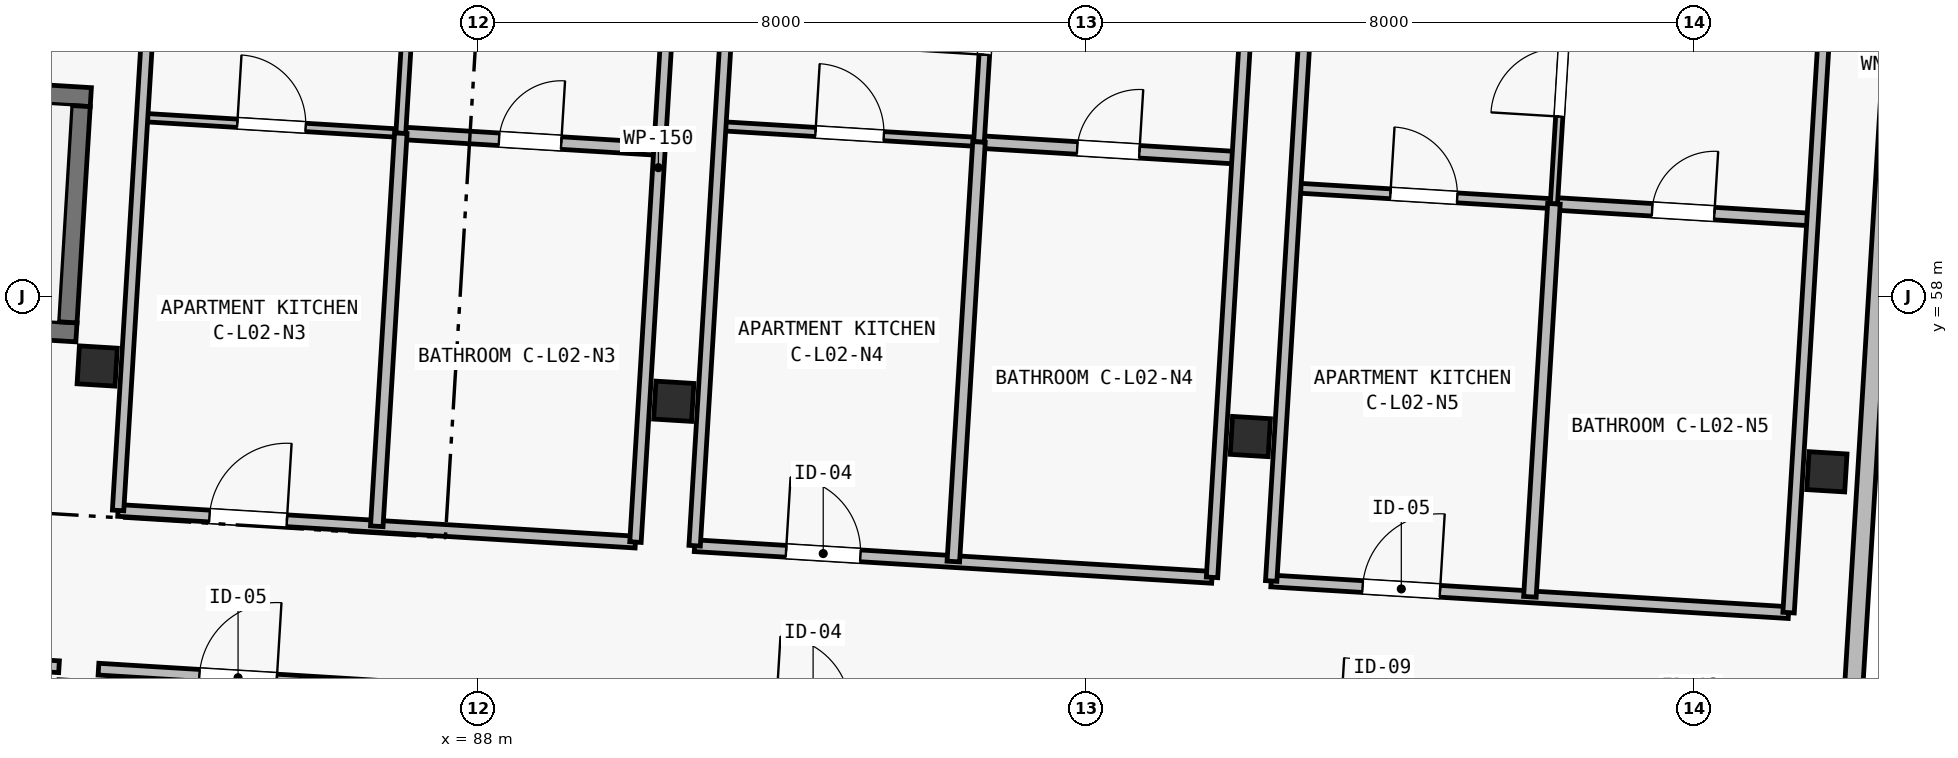
"""IFC4 building model, lengths in metres.
Left out: names, types, materials, properties, quantities, classifications, styles, units other than length and angle.
Written with IfcOpenShell. Run it as: python <this file> out.ifc"""

import sys

from ifc_helpers import new_model, si_unit, direction, frame, frame_2d, origin, origin_2d, place, context, subcontext, project, spatial, rectangle, extrude, element, fill, save


model = new_model("IFC4")
c1 = context("Model", 3, precision=1e-05, world=origin(), true_north=direction((0.0, 1.0)))
c2 = subcontext(c1, "Body", "Model", "MODEL_VIEW")
j1 = project(units=[si_unit("LENGTHUNIT", "METRE"), si_unit("PLANEANGLEUNIT", "RADIAN")], contexts=[c1])
p1 = place(None, origin())
s1 = spatial("IfcSite", under=j1, at=p1, CompositionType="ELEMENT")
p2 = place(p1, origin())
s2 = spatial("IfcBuilding", under=s1, at=p2, CompositionType="ELEMENT")
p3 = place(p2, frame((0.0, 0.0, 8.4)))
s3 = spatial("IfcBuildingStorey", under=s2, at=p3, CompositionType="ELEMENT", Elevation=8.4)
for number, where, z_axis, x_axis in (
    (1, (82.99, 57.086, 0.0), (0.0, 0.0, 1.0), (0.998, -0.061, 0.0)),
    (2, (90.576, 56.622, 0.0), (0.0, 0.0, 1.0), (0.998, -0.061, 0.0)),
    (3, (98.162, 56.158, 0.0), (0.0, 0.0, 1.0), (0.998, -0.061, 0.0)),
    (4, (105.748, 55.694, 0.0), (0.0, 0.0, 1.0), (0.998, -0.061, 0.0)),
):
    element("IfcColumn", number, at=place(p3, frame(where, z_axis=z_axis, x_axis=x_axis)), inside=s3, PredefinedType="COLUMN", context=c2, shape_type="SweptSolid", body=[
        extrude(rectangle(XDim=0.5, YDim=0.5, at=origin_2d()), origin(), (0.0, 0.0, 1.0), 3.25),
    ])
p4 = place(p3, frame((75.919, 61.05, 0.0), z_axis=(0.0, 0.0, 1.0), x_axis=(0.998135546153, -0.061036313012, 0.0)))
e5 = element("IfcWall", 5, at=p4, inside=s3, PredefinedType="SHEAR", context=c2, shape_type="SweptSolid", body=[
    extrude(rectangle(XDim=7.0, YDim=0.25, at=frame_2d((3.5, 0.0))), origin(), (0.0, 0.0, 1.0), 3.25),
])
p5 = place(p4, frame((0.45, 0.0, 0.0)))
e6 = element("IfcOpeningElement", 6, at=p5, cuts=e5, PredefinedType="OPENING", context=c2, shape_type="SweptSolid", body=[
    extrude(rectangle(XDim=0.9, YDim=2.1, at=frame_2d((0.45, 1.05))), frame((0.0, 0.14, 0.0), z_axis=(0.0, -1.0, 0.0), x_axis=(1.0, 0.0, 0.0)), (0.0, 0.0, 1.0), 0.28),
])
p6 = place(p3, frame((75.73, 57.956, 0.0), z_axis=(0.0, 0.0, 1.0), x_axis=(0.998135546153, -0.061036313012, 0.0)))
e7 = element("IfcWall", 7, at=p6, inside=s3, PredefinedType="SHEAR", context=c2, shape_type="SweptSolid", body=[
    extrude(rectangle(XDim=7.0, YDim=0.25, at=frame_2d((3.5, 0.0))), origin(), (0.0, 0.0, 1.0), 3.25),
])
p7 = place(p6, frame((0.45, 0.0, 0.0)))
e8 = element("IfcOpeningElement", 8, at=p7, cuts=e7, PredefinedType="OPENING", context=c2, shape_type="SweptSolid", body=[
    extrude(rectangle(XDim=1.05, YDim=2.15, at=frame_2d((0.525, 1.075))), frame((0.0, 0.14, 0.0), z_axis=(0.0, -1.0, 0.0), x_axis=(1.0, 0.0, 0.0)), (0.0, 0.0, 1.0), 0.28),
])
p8 = place(p3, frame((82.599, 57.661, 0.0), z_axis=(0.0, 0.0, 1.0), x_axis=(0.06107697143, 0.998133059046, 0.0)))
e9 = element("IfcWall", 9, at=p8, inside=s3, PredefinedType="SHEAR", context=c2, shape_type="SweptSolid", body=[
    extrude(rectangle(XDim=2.85, YDim=0.25, at=frame_2d((1.425, 0.0))), origin(), (0.0, 0.0, 1.0), 3.25),
])
p9 = place(p3, frame((106.768, 63.771, 0.0), z_axis=(0.0, 0.0, 1.0), x_axis=(-0.061053332998, -0.99813450523, 0.0)))
e10 = element("IfcWall", 10, at=p9, inside=s3, PredefinedType="SOLIDWALL", context=c2, shape_type="SweptSolid", body=[
    extrude(rectangle(XDim=20.65, YDim=0.24, at=frame_2d((10.325, 0.0))), origin(), (0.0, 0.0, 1.0), 3.0),
])
p10 = place(p9, frame((2.81, 0.0, 0.45)))
e11 = element("IfcOpeningElement", 11, at=p10, cuts=e10, PredefinedType="OPENING", context=c2, shape_type="SweptSolid", body=[
    extrude(rectangle(XDim=0.6, YDim=2.22, at=frame_2d((0.3, 1.11))), frame((0.0, 0.135, 0.0), z_axis=(0.0, -1.0, 0.0), x_axis=(1.0, 0.0, 0.0)), (0.0, 0.0, 1.0), 0.27),
])
p11 = place(p9, frame((17.1, 0.0, 0.52)))
e12 = element("IfcOpeningElement", 12, at=p11, cuts=e10, PredefinedType="OPENING", context=c2, shape_type="SweptSolid", body=[
    extrude(rectangle(XDim=0.74, YDim=2.26, at=frame_2d((0.37, 1.13))), frame((0.0, 0.135, 0.0), z_axis=(0.0, -1.0, 0.0), x_axis=(1.0, 0.0, 0.0)), (0.0, 0.0, 1.0), 0.27),
])
p12 = place(p3, frame((78.415, 53.378, 0.0), z_axis=(0.0, 0.0, 1.0), x_axis=(0.998131852862, -0.061096679962, 0.0)))
e13 = element("IfcWall", 13, at=p12, inside=s3, PredefinedType="PARTITIONING", context=c2, shape_type="SweptSolid", body=[
    extrude(rectangle(XDim=4.08, YDim=0.155, at=frame_2d((2.04, 0.0))), origin(), (0.0, 0.0, 1.0), 2.97),
])
p13 = place(p12, frame((0.457, 0.0, 0.0)))
e14 = element("IfcOpeningElement", 14, at=p13, cuts=e13, PredefinedType="OPENING", context=c2, shape_type="SweptSolid", body=[
    extrude(rectangle(XDim=0.98, YDim=2.15, at=frame_2d((0.49, 1.075))), frame((0.0, 0.093, 0.0), z_axis=(0.0, -1.0, 0.0), x_axis=(1.0, 0.0, 0.0)), (0.0, 0.0, 1.0), 0.185),
])
p14 = place(p3, frame((83.007, 53.097, 0.0), z_axis=(0.0, 0.0, 1.0), x_axis=(0.998135666539, -0.061034344288, 0.0)))
e15 = element("IfcWall", 15, at=p14, inside=s3, PredefinedType="PARTITIONING", context=c2, shape_type="SweptSolid", body=[
    extrude(rectangle(XDim=7.08, YDim=0.155, at=frame_2d((3.54, 0.0))), origin(), (0.0, 0.0, 1.0), 2.97),
])
p15 = place(p14, frame((1.33, 0.0, 0.0)))
e16 = element("IfcOpeningElement", 16, at=p15, cuts=e15, PredefinedType="OPENING", context=c2, shape_type="SweptSolid", body=[
    extrude(rectangle(XDim=1.02, YDim=2.2, at=frame_2d((0.51, 1.1))), frame((0.0, 0.093, 0.0), z_axis=(0.0, -1.0, 0.0), x_axis=(1.0, 0.0, 0.0)), (0.0, 0.0, 1.0), 0.185),
])
p16 = place(p3, frame((83.265, 55.185, 0.0), z_axis=(0.0, 0.0, 1.0), x_axis=(0.998135531673, -0.061036549799, 0.0)))
e17 = element("IfcWall", 17, at=p16, inside=s3, PredefinedType="PARTITIONING", context=c2, shape_type="SweptSolid", body=[
    extrude(rectangle(XDim=6.82, YDim=0.155, at=frame_2d((3.41, 0.0))), origin(), (0.0, 0.0, 1.0), 2.97),
])
p17 = place(p16, frame((1.205, 0.0, 0.0)))
e18 = element("IfcOpeningElement", 18, at=p17, cuts=e17, PredefinedType="OPENING", context=c2, shape_type="SweptSolid", body=[
    extrude(rectangle(XDim=1.02, YDim=2.2, at=frame_2d((0.51, 1.1))), frame((0.0, 0.093, 0.0), z_axis=(0.0, -1.0, 0.0), x_axis=(1.0, 0.0, 0.0)), (0.0, 0.0, 1.0), 0.185),
])
p18 = place(p3, frame((83.581, 60.356, 0.0), z_axis=(0.0, 0.0, 1.0), x_axis=(0.998133350094, -0.061072214879, 0.0)))
e19 = element("IfcWall", 19, at=p18, inside=s3, PredefinedType="PARTITIONING", context=c2, shape_type="SweptSolid", body=[
    extrude(rectangle(XDim=3.41, YDim=0.11, at=frame_2d((1.705, 0.0))), origin(), (0.0, 0.0, 1.0), 2.97),
])
p19 = place(p18, frame((1.255, 0.0, 0.0)))
e20 = element("IfcOpeningElement", 20, at=p19, cuts=e19, PredefinedType="OPENING", context=c2, shape_type="SweptSolid", body=[
    extrude(rectangle(XDim=0.9, YDim=2.1, at=frame_2d((0.45, 1.05))), frame((0.0, 0.07, 0.0), z_axis=(0.0, -1.0, 0.0), x_axis=(1.0, 0.0, 0.0)), (0.0, 0.0, 1.0), 0.14),
])
p20 = place(p3, frame((86.984, 60.147, 0.0), z_axis=(0.0, 0.0, 1.0), x_axis=(0.99813797838, -0.060996525433, 0.0)))
e21 = element("IfcWall", 21, at=p20, inside=s3, PredefinedType="PLUMBINGWALL", context=c2, shape_type="SweptSolid", body=[
    extrude(rectangle(XDim=3.41, YDim=0.165, at=frame_2d((1.705, 0.0))), origin(), (0.0, 0.0, 1.0), 2.97),
])
p21 = place(p20, frame((1.295, 0.0, 0.0)))
e22 = element("IfcOpeningElement", 22, at=p21, cuts=e21, PredefinedType="OPENING", context=c2, shape_type="SweptSolid", body=[
    extrude(rectangle(XDim=0.82, YDim=2.08, at=frame_2d((0.41, 1.04))), frame((0.0, 0.097, 0.0), z_axis=(0.0, -1.0, 0.0), x_axis=(1.0, 0.0, 0.0)), (0.0, 0.0, 1.0), 0.195),
])
p22 = place(p3, frame((86.984, 60.147, 0.0), z_axis=(0.0, 0.0, 1.0), x_axis=(0.061059262019, 0.998134142549, 0.0)))
e23 = element("IfcWall", 23, at=p22, inside=s3, PredefinedType="PARTITIONING", context=c2, shape_type="SweptSolid", body=[
    extrude(rectangle(XDim=4.69, YDim=0.13, at=frame_2d((2.345, 0.0))), origin(), (0.0, 0.0, 1.0), 2.97),
])
p23 = place(p22, frame((1.15, 0.0, 0.0)))
e24 = element("IfcOpeningElement", 24, at=p23, cuts=e23, PredefinedType="OPENING", context=c2, shape_type="SweptSolid", body=[
    extrude(rectangle(XDim=0.88, YDim=2.1, at=frame_2d((0.44, 1.05))), frame((0.0, 0.08, 0.0), z_axis=(0.0, -1.0, 0.0), x_axis=(1.0, 0.0, 0.0)), (0.0, 0.0, 1.0), 0.16),
])
p24 = place(p3, frame((86.668, 54.977, 0.0), z_axis=(0.0, 0.0, 1.0), x_axis=(0.061037231879, 0.998135489963, 0.0)))
e25 = element("IfcWall", 25, at=p24, inside=s3, PredefinedType="PLUMBINGWALL", context=c2, shape_type="SweptSolid", body=[
    extrude(rectangle(XDim=5.18, YDim=0.165, at=frame_2d((2.59, 0.0))), origin(), (0.0, 0.0, 1.0), 2.97),
])
p25 = place(p3, frame((83.265, 55.185, 0.0), z_axis=(0.0, 0.0, 1.0), x_axis=(0.061046193261, 0.998134941923, 0.0)))
e26 = element("IfcWall", 26, at=p25, inside=s3, PredefinedType="PARTITIONING", context=c2, shape_type="SweptSolid", body=[
    extrude(rectangle(XDim=9.87, YDim=0.15, at=frame_2d((4.935, 0.0))), origin(), (0.0, 0.0, 1.0), 2.97),
])
p26 = place(p3, frame((90.072, 54.769, 0.0), z_axis=(0.0, 0.0, 1.0), x_axis=(0.061047700465, 0.998134849741, 0.0)))
e27 = element("IfcWall", 27, at=p26, inside=s3, PredefinedType="PARTITIONING", context=c2, shape_type="SweptSolid", body=[
    extrude(rectangle(XDim=9.87, YDim=0.15, at=frame_2d((4.935, 0.0))), origin(), (0.0, 0.0, 1.0), 2.97),
])
p27 = place(p3, frame((90.85, 54.721, 0.0), z_axis=(0.0, 0.0, 1.0), x_axis=(0.998135665032, -0.06103436893, 0.0)))
e28 = element("IfcWall", 28, at=p27, inside=s3, PredefinedType="PARTITIONING", context=c2, shape_type="SweptSolid", body=[
    extrude(rectangle(XDim=6.82, YDim=0.155, at=frame_2d((3.41, 0.0))), origin(), (0.0, 0.0, 1.0), 2.97),
])
p28 = place(p27, frame((1.205, 0.0, 0.0)))
e29 = element("IfcOpeningElement", 29, at=p28, cuts=e28, PredefinedType="OPENING", context=c2, shape_type="SweptSolid", body=[
    extrude(rectangle(XDim=0.98, YDim=2.15, at=frame_2d((0.49, 1.075))), frame((0.0, 0.093, 0.0), z_axis=(0.0, -1.0, 0.0), x_axis=(1.0, 0.0, 0.0)), (0.0, 0.0, 1.0), 0.185),
])
p29 = place(p3, frame((91.188, 60.241, 0.0), z_axis=(0.0, 0.0, 1.0), x_axis=(0.998133350094, -0.061072214879, 0.0)))
e30 = element("IfcWall", 30, at=p29, inside=s3, PredefinedType="PARTITIONING", context=c2, shape_type="SweptSolid", body=[
    extrude(rectangle(XDim=3.41, YDim=0.12, at=frame_2d((1.705, 0.0))), origin(), (0.0, 0.0, 1.0), 2.97),
])
p30 = place(p29, frame((1.255, 0.0, 0.0)))
e31 = element("IfcOpeningElement", 31, at=p30, cuts=e30, PredefinedType="OPENING", context=c2, shape_type="SweptSolid", body=[
    extrude(rectangle(XDim=0.9, YDim=2.1, at=frame_2d((0.45, 1.05))), frame((0.0, 0.075, 0.0), z_axis=(0.0, -1.0, 0.0), x_axis=(1.0, 0.0, 0.0)), (0.0, 0.0, 1.0), 0.15),
])
p31 = place(p3, frame((94.592, 60.033, 0.0), z_axis=(0.0, 0.0, 1.0), x_axis=(0.998133617109, -0.061067850767, 0.0)))
e32 = element("IfcWall", 32, at=p31, inside=s3, PredefinedType="PLUMBINGWALL", context=c2, shape_type="SweptSolid", body=[
    extrude(rectangle(XDim=3.41, YDim=0.165, at=frame_2d((1.705, 0.0))), origin(), (0.0, 0.0, 1.0), 2.97),
])
p32 = place(p31, frame((1.295, 0.0, 0.0)))
e33 = element("IfcOpeningElement", 33, at=p32, cuts=e32, PredefinedType="OPENING", context=c2, shape_type="SweptSolid", body=[
    extrude(rectangle(XDim=0.82, YDim=2.08, at=frame_2d((0.41, 1.04))), frame((0.0, 0.097, 0.0), z_axis=(0.0, -1.0, 0.0), x_axis=(1.0, 0.0, 0.0)), (0.0, 0.0, 1.0), 0.195),
])
p33 = place(p3, frame((94.592, 60.033, 0.0), z_axis=(0.0, 0.0, 1.0), x_axis=(0.061092906669, 0.998132083822, 0.0)))
e34 = element("IfcWall", 34, at=p33, inside=s3, PredefinedType="PARTITIONING", context=c2, shape_type="SweptSolid", body=[
    extrude(rectangle(XDim=4.34, YDim=0.14, at=frame_2d((2.17, 0.0))), origin(), (0.0, 0.0, 1.0), 2.97),
])
p34 = place(p33, frame((1.15, 0.0, 0.0)))
e35 = element("IfcOpeningElement", 35, at=p34, cuts=e34, PredefinedType="OPENING", context=c2, shape_type="SweptSolid", body=[
    extrude(rectangle(XDim=0.9, YDim=2.1, at=frame_2d((0.45, 1.05))), frame((0.0, 0.085, 0.0), z_axis=(0.0, -1.0, 0.0), x_axis=(1.0, 0.0, 0.0)), (0.0, 0.0, 1.0), 0.17),
])
p35 = place(p3, frame((94.254, 54.513, 0.0), z_axis=(0.0, 0.0, 1.0), x_axis=(0.061056206715, 0.998134329447, 0.0)))
e36 = element("IfcWall", 36, at=p35, inside=s3, PredefinedType="PLUMBINGWALL", context=c2, shape_type="SweptSolid", body=[
    extrude(rectangle(XDim=5.53, YDim=0.165, at=frame_2d((2.765, 0.0))), origin(), (0.0, 0.0, 1.0), 2.97),
])
for number, where, z_axis, x_axis in (
    (37, (90.85, 54.721, 0.0), (0.0, 0.0, 1.0), (0.061, 0.998, 0.0)),
    (38, (97.658, 54.305, 0.0), (0.0, 0.0, 1.0), (0.061, 0.998, 0.0)),
):
    element("IfcWall", number, at=place(p3, frame(where, z_axis=z_axis, x_axis=x_axis)), inside=s3, PredefinedType="PARTITIONING", context=c2, shape_type="SweptSolid", body=[
        extrude(rectangle(XDim=9.87, YDim=0.15, at=frame_2d((4.935, 0.0))), origin(), (0.0, 0.0, 1.0), 2.97),
    ])
p36 = place(p3, frame((98.436, 54.258, 0.0), z_axis=(0.0, 0.0, 1.0), x_axis=(0.998133350094, -0.061072214879, 0.0)))
e39 = element("IfcWall", 39, at=p36, inside=s3, PredefinedType="PARTITIONING", context=c2, shape_type="SweptSolid", body=[
    extrude(rectangle(XDim=6.82, YDim=0.155, at=frame_2d((3.41, 0.0))), origin(), (0.0, 0.0, 1.0), 2.97),
])
p37 = place(p36, frame((1.205, 0.0, 0.0)))
e40 = element("IfcOpeningElement", 40, at=p37, cuts=e39, PredefinedType="OPENING", context=c2, shape_type="SweptSolid", body=[
    extrude(rectangle(XDim=1.02, YDim=2.2, at=frame_2d((0.51, 1.1))), frame((0.0, 0.093, 0.0), z_axis=(0.0, -1.0, 0.0), x_axis=(1.0, 0.0, 0.0)), (0.0, 0.0, 1.0), 0.185),
])
p38 = place(p3, frame((98.752, 59.428, 0.0), z_axis=(0.0, 0.0, 1.0), x_axis=(0.998137711988, -0.061000884486, 0.0)))
e41 = element("IfcWall", 41, at=p38, inside=s3, PredefinedType="PARTITIONING", context=c2, shape_type="SweptSolid", body=[
    extrude(rectangle(XDim=3.41, YDim=0.13, at=frame_2d((1.705, 0.0))), origin(), (0.0, 0.0, 1.0), 2.97),
])
p39 = place(p38, frame((1.255, 0.0, 0.0)))
e42 = element("IfcOpeningElement", 42, at=p39, cuts=e41, PredefinedType="OPENING", context=c2, shape_type="SweptSolid", body=[
    extrude(rectangle(XDim=0.88, YDim=2.1, at=frame_2d((0.44, 1.05))), frame((0.0, 0.08, 0.0), z_axis=(0.0, -1.0, 0.0), x_axis=(1.0, 0.0, 0.0)), (0.0, 0.0, 1.0), 0.16),
])
p40 = place(p3, frame((102.156, 59.22, 0.0), z_axis=(0.0, 0.0, 1.0), x_axis=(0.998133617109, -0.061067850767, 0.0)))
e43 = element("IfcWall", 43, at=p40, inside=s3, PredefinedType="PLUMBINGWALL", context=c2, shape_type="SweptSolid", body=[
    extrude(rectangle(XDim=3.41, YDim=0.165, at=frame_2d((1.705, 0.0))), origin(), (0.0, 0.0, 1.0), 2.97),
])
p41 = place(p40, frame((1.295, 0.0, 0.0)))
e44 = element("IfcOpeningElement", 44, at=p41, cuts=e43, PredefinedType="OPENING", context=c2, shape_type="SweptSolid", body=[
    extrude(rectangle(XDim=0.82, YDim=2.08, at=frame_2d((0.41, 1.04))), frame((0.0, 0.097, 0.0), z_axis=(0.0, -1.0, 0.0), x_axis=(1.0, 0.0, 0.0)), (0.0, 0.0, 1.0), 0.195),
])
p42 = place(p3, frame((102.156, 59.22, 0.0), z_axis=(0.0, 0.0, 1.0), x_axis=(0.061062434628, 0.998133948465, 0.0)))
e45 = element("IfcWall", 45, at=p42, inside=s3, PredefinedType="PARTITIONING", context=c2, shape_type="SweptSolid", body=[
    extrude(rectangle(XDim=4.69, YDim=0.095, at=frame_2d((2.345, 0.0))), origin(), (0.0, 0.0, 1.0), 2.97),
])
p43 = place(p42, frame((1.15, 0.0, 0.0)))
e46 = element("IfcOpeningElement", 46, at=p43, cuts=e45, PredefinedType="OPENING", context=c2, shape_type="SweptSolid", body=[
    extrude(rectangle(XDim=0.9, YDim=2.1, at=frame_2d((0.45, 1.05))), frame((0.0, 0.062, 0.0), z_axis=(0.0, -1.0, 0.0), x_axis=(1.0, 0.0, 0.0)), (0.0, 0.0, 1.0), 0.125),
])
p44 = place(p3, frame((101.84, 54.049, 0.0), z_axis=(0.0, 0.0, 1.0), x_axis=(0.06103436051, 0.998135665547, 0.0)))
e47 = element("IfcWall", 47, at=p44, inside=s3, PredefinedType="PLUMBINGWALL", context=c2, shape_type="SweptSolid", body=[
    extrude(rectangle(XDim=5.18, YDim=0.165, at=frame_2d((2.59, 0.0))), origin(), (0.0, 0.0, 1.0), 2.97),
])
for number, where, z_axis, x_axis in (
    (48, (98.436, 54.258, 0.0), (0.0, 0.0, 1.0), (0.061, 0.998, 0.0)),
    (49, (105.243, 53.841, 0.0), (0.0, 0.0, 1.0), (0.061, 0.998, 0.0)),
):
    element("IfcWall", number, at=place(p3, frame(where, z_axis=z_axis, x_axis=x_axis)), inside=s3, PredefinedType="PARTITIONING", context=c2, shape_type="SweptSolid", body=[
        extrude(rectangle(XDim=9.87, YDim=0.15, at=frame_2d((4.935, 0.0))), origin(), (0.0, 0.0, 1.0), 2.97),
    ])
p45 = place(p15, origin())
e50 = element("IfcDoor", 50, at=p45, inside=s3, OperationType="SINGLE_SWING_RIGHT", PredefinedType="DOOR", context=c2, shape_type="SweptSolid", body=[
    extrude(rectangle(XDim=1.02, YDim=2.2, at=frame_2d((0.51, 1.1))), frame((0.0, 0.025, 0.0), z_axis=(0.0, -1.0, 0.0), x_axis=(1.0, 0.0, 0.0)), (0.0, 0.0, 1.0), 0.05),
])
fill(e16, e50)
p46 = place(p17, origin())
e51 = element("IfcDoor", 51, at=p46, inside=s3, OperationType="SINGLE_SWING_RIGHT", PredefinedType="DOOR", context=c2, shape_type="SweptSolid", body=[
    extrude(rectangle(XDim=1.02, YDim=2.2, at=frame_2d((0.51, 1.1))), frame((0.0, 0.025, 0.0), z_axis=(0.0, -1.0, 0.0), x_axis=(1.0, 0.0, 0.0)), (0.0, 0.0, 1.0), 0.05),
])
fill(e18, e51)
p47 = place(p19, origin())
e52 = element("IfcDoor", 52, at=p47, inside=s3, OperationType="SINGLE_SWING_LEFT", PredefinedType="DOOR", context=c2, shape_type="SweptSolid", body=[
    extrude(rectangle(XDim=0.9, YDim=2.1, at=frame_2d((0.45, 1.05))), frame((0.0, 0.025, 0.0), z_axis=(0.0, -1.0, 0.0), x_axis=(1.0, 0.0, 0.0)), (0.0, 0.0, 1.0), 0.05),
])
fill(e20, e52)
p48 = place(p21, origin())
e53 = element("IfcDoor", 53, at=p48, inside=s3, OperationType="SINGLE_SWING_RIGHT", PredefinedType="DOOR", context=c2, shape_type="SweptSolid", body=[
    extrude(rectangle(XDim=0.82, YDim=2.08, at=frame_2d((0.41, 1.04))), frame((0.0, 0.025, 0.0), z_axis=(0.0, -1.0, 0.0), x_axis=(1.0, 0.0, 0.0)), (0.0, 0.0, 1.0), 0.05),
])
fill(e22, e53)
p49 = place(p28, origin())
e54 = element("IfcDoor", 54, at=p49, inside=s3, OperationType="SINGLE_SWING_LEFT", PredefinedType="DOOR", context=c2, shape_type="SweptSolid", body=[
    extrude(rectangle(XDim=0.98, YDim=2.15, at=frame_2d((0.49, 1.075))), frame((0.0, 0.025, 0.0), z_axis=(0.0, -1.0, 0.0), x_axis=(1.0, 0.0, 0.0)), (0.0, 0.0, 1.0), 0.05),
])
fill(e29, e54)
p50 = place(p30, origin())
e55 = element("IfcDoor", 55, at=p50, inside=s3, OperationType="SINGLE_SWING_LEFT", PredefinedType="DOOR", context=c2, shape_type="SweptSolid", body=[
    extrude(rectangle(XDim=0.9, YDim=2.1, at=frame_2d((0.45, 1.05))), frame((0.0, 0.025, 0.0), z_axis=(0.0, -1.0, 0.0), x_axis=(1.0, 0.0, 0.0)), (0.0, 0.0, 1.0), 0.05),
])
fill(e31, e55)
p51 = place(p32, origin())
e56 = element("IfcDoor", 56, at=p51, inside=s3, OperationType="SINGLE_SWING_RIGHT", PredefinedType="DOOR", context=c2, shape_type="SweptSolid", body=[
    extrude(rectangle(XDim=0.82, YDim=2.08, at=frame_2d((0.41, 1.04))), frame((0.0, 0.025, 0.0), z_axis=(0.0, -1.0, 0.0), x_axis=(1.0, 0.0, 0.0)), (0.0, 0.0, 1.0), 0.05),
])
fill(e33, e56)
p52 = place(p34, origin())
e57 = element("IfcDoor", 57, at=p52, inside=s3, OperationType="SINGLE_SWING_LEFT", PredefinedType="DOOR", context=c2, shape_type="SweptSolid", body=[
    extrude(rectangle(XDim=0.9, YDim=2.1, at=frame_2d((0.45, 1.05))), frame((0.0, 0.025, 0.0), z_axis=(0.0, -1.0, 0.0), x_axis=(1.0, 0.0, 0.0)), (0.0, 0.0, 1.0), 0.05),
])
fill(e35, e57)
p53 = place(p37, origin())
e58 = element("IfcDoor", 58, at=p53, inside=s3, OperationType="SINGLE_SWING_RIGHT", PredefinedType="DOOR", context=c2, shape_type="SweptSolid", body=[
    extrude(rectangle(XDim=1.02, YDim=2.2, at=frame_2d((0.51, 1.1))), frame((0.0, 0.025, 0.0), z_axis=(0.0, -1.0, 0.0), x_axis=(1.0, 0.0, 0.0)), (0.0, 0.0, 1.0), 0.05),
])
fill(e40, e58)
p54 = place(p39, origin())
e59 = element("IfcDoor", 59, at=p54, inside=s3, OperationType="SINGLE_SWING_LEFT", PredefinedType="DOOR", context=c2, shape_type="SweptSolid", body=[
    extrude(rectangle(XDim=0.88, YDim=2.1, at=frame_2d((0.44, 1.05))), frame((0.0, 0.025, 0.0), z_axis=(0.0, -1.0, 0.0), x_axis=(1.0, 0.0, 0.0)), (0.0, 0.0, 1.0), 0.05),
])
fill(e42, e59)
p55 = place(p41, origin())
e60 = element("IfcDoor", 60, at=p55, inside=s3, OperationType="SINGLE_SWING_RIGHT", PredefinedType="DOOR", context=c2, shape_type="SweptSolid", body=[
    extrude(rectangle(XDim=0.82, YDim=2.08, at=frame_2d((0.41, 1.04))), frame((0.0, 0.025, 0.0), z_axis=(0.0, -1.0, 0.0), x_axis=(1.0, 0.0, 0.0)), (0.0, 0.0, 1.0), 0.05),
])
fill(e44, e60)
p56 = place(p43, origin())
e61 = element("IfcDoor", 61, at=p56, inside=s3, OperationType="SINGLE_SWING_LEFT", PredefinedType="DOOR", context=c2, shape_type="SweptSolid", body=[
    extrude(rectangle(XDim=0.9, YDim=2.1, at=frame_2d((0.45, 1.05))), frame((0.0, 0.025, 0.0), z_axis=(0.0, -1.0, 0.0), x_axis=(1.0, 0.0, 0.0)), (0.0, 0.0, 1.0), 0.05),
])
fill(e46, e61)
save(model, sys.argv[1])
